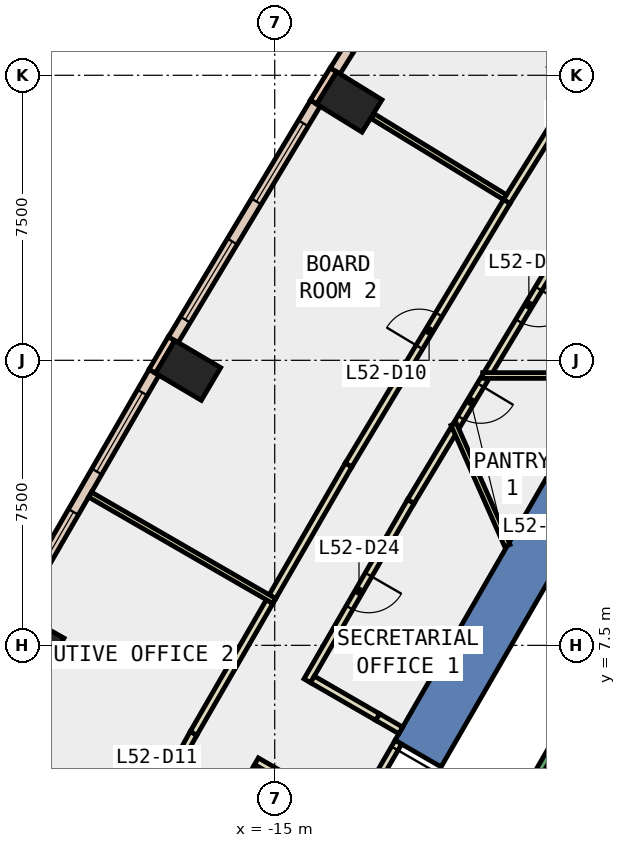
"""IFC4 building model, lengths in metres.
Left out: names, types, materials, properties, quantities, classifications, styles, units other than length and angle.
Written with IfcOpenShell. Run it as: python <this file> out.ifc"""

import sys

from ifc_helpers import new_model, si_unit, direction, frame, frame_2d, origin, origin_2d, place, context, subcontext, project, spatial, polyline, rectangle, outline, extrude, element, fill, save


model = new_model("IFC4")
c1 = context("Model", 3, precision=1e-05, world=origin(), true_north=direction((0.0, 1.0)))
c2 = subcontext(c1, "Body", "Model", "MODEL_VIEW")
j1 = project(units=[si_unit("LENGTHUNIT", "METRE"), si_unit("PLANEANGLEUNIT", "RADIAN")], contexts=[c1])
p1 = place(None, origin())
s1 = spatial("IfcSite", under=j1, at=p1, CompositionType="ELEMENT")
p2 = place(p1, origin())
s2 = spatial("IfcBuilding", under=s1, at=p2, CompositionType="ELEMENT")
p3 = place(p2, frame((0.0, 0.0, 231.8)))
s3 = spatial("IfcBuildingStorey", under=s2, at=p3, CompositionType="ELEMENT", Elevation=231.8)
for number, where, z_axis, x_axis in (
    (1, (-13.036, 21.797, -0.4), (0.0, 0.0, 1.0), (0.525, 0.851, 0.0)),
    (2, (-17.28, 14.733, -0.4), (0.0, 0.0, 1.0), (0.509, 0.861, 0.0)),
    (3, (-21.4, 7.599, -0.4), (0.0, 0.0, 1.0), (0.491, 0.871, 0.0)),
):
    element("IfcColumn", number, at=place(p3, frame(where, z_axis=z_axis, x_axis=x_axis)), inside=s3, PredefinedType="COLUMN", context=c2, shape_type="SweptSolid", body=[
        extrude(rectangle(XDim=1.0, YDim=1.4, at=origin_2d()), origin(), (0.0, 0.0, 1.0), 4.0),
    ])
p4 = place(p3, frame((0.0, 0.0, -0.4)))
e4 = element("IfcWall", 4, at=p4, inside=s3, PredefinedType="SHEAR", context=c2, shape_type="SweptSolid", body=[
    extrude(outline(polyline([(-11.834, 5.002), (-10.622, 4.302), (-5.831, 12.6), (-6.64, 14.0), (-11.834, 5.002)])), origin(), (0.0, 0.0, 1.0), 4.0),
])
p5 = place(p3, frame((-13.454, 22.643, 0.0), z_axis=(0.0, 0.0, 1.0), x_axis=(-0.525648735675, -0.850701714282, 0.0)))
e5 = element("IfcWall", 5, at=p5, inside=s3, PredefinedType="STANDARD", context=c2, shape_type="SweptSolid", body=[
    extrude(rectangle(XDim=1.0, YDim=0.2, at=frame_2d((0.5, 0.0))), origin(), (0.0, 0.0, 1.0), 3.6),
])
p6 = place(p3, frame((-17.715, 15.571, 0.0), z_axis=(0.0, 0.0, 1.0), x_axis=(-0.507980373775, -0.861368643416, 0.0)))
e6 = element("IfcWall", 6, at=p6, inside=s3, PredefinedType="STANDARD", context=c2, shape_type="SweptSolid", body=[
    extrude(rectangle(XDim=1.0, YDim=0.2, at=frame_2d((0.5, 0.0))), origin(), (0.0, 0.0, 1.0), 3.6),
])
p7 = place(p3, frame((-9.485, 28.893, 0.0), z_axis=(0.0, 0.0, 1.0), x_axis=(-0.530037467052, -0.847974223383, 0.0)))
e7 = element("IfcWall", 7, at=p7, inside=s3, PredefinedType="STANDARD", context=c2, shape_type="SweptSolid", body=[
    extrude(rectangle(XDim=7.405, YDim=0.3, at=frame_2d((3.702, 0.0))), origin(), (0.0, 0.0, 1.0), 3.6),
])
p8 = place(p7, frame((0.651, 0.0, 0.9)))
e8 = element("IfcOpeningElement", 8, at=p8, cuts=e7, PredefinedType="OPENING", context=c2, shape_type="SweptSolid", body=[
    extrude(rectangle(XDim=2.4, YDim=2.6, at=frame_2d((1.2, 1.3))), frame((0.0, 0.16, 0.0), z_axis=(0.0, -1.0, 0.0), x_axis=(1.0, 0.0, 0.0)), (0.0, 0.0, 1.0), 0.32),
])
p9 = place(p7, frame((4.354, 0.0, 0.9)))
e9 = element("IfcOpeningElement", 9, at=p9, cuts=e7, PredefinedType="OPENING", context=c2, shape_type="SweptSolid", body=[
    extrude(rectangle(XDim=2.4, YDim=2.6, at=frame_2d((1.2, 1.3))), frame((0.0, 0.16, 0.0), z_axis=(0.0, -1.0, 0.0), x_axis=(1.0, 0.0, 0.0)), (0.0, 0.0, 1.0), 0.32),
])
p10 = place(p3, frame((-13.931, 21.763, 0.0), z_axis=(0.0, 0.0, 1.0), x_axis=(-0.515049705348, -0.857160312323, 0.0)))
e10 = element("IfcWall", 10, at=p10, inside=s3, PredefinedType="STANDARD", context=c2, shape_type="SweptSolid", body=[
    extrude(rectangle(XDim=7.258, YDim=0.3, at=frame_2d((3.629, 0.0))), origin(), (0.0, 0.0, 1.0), 3.6),
])
p11 = place(p10, frame((0.614, 0.0, 0.9)))
e11 = element("IfcOpeningElement", 11, at=p11, cuts=e10, PredefinedType="OPENING", context=c2, shape_type="SweptSolid", body=[
    extrude(rectangle(XDim=2.4, YDim=2.6, at=frame_2d((1.2, 1.3))), frame((0.0, 0.16, 0.0), z_axis=(0.0, -1.0, 0.0), x_axis=(1.0, 0.0, 0.0)), (0.0, 0.0, 1.0), 0.32),
])
p12 = place(p10, frame((4.243, 0.0, 0.9)))
e12 = element("IfcOpeningElement", 12, at=p12, cuts=e10, PredefinedType="OPENING", context=c2, shape_type="SweptSolid", body=[
    extrude(rectangle(XDim=2.4, YDim=2.6, at=frame_2d((1.2, 1.3))), frame((0.0, 0.16, 0.0), z_axis=(0.0, -1.0, 0.0), x_axis=(1.0, 0.0, 0.0)), (0.0, 0.0, 1.0), 0.32),
])
p13 = place(p3, frame((-18.175, 14.683, 0.0), z_axis=(0.0, 0.0, 1.0), x_axis=(-0.500075798504, -0.865981637075, 0.0)))
e13 = element("IfcWall", 13, at=p13, inside=s3, PredefinedType="STANDARD", context=c2, shape_type="SweptSolid", body=[
    extrude(rectangle(XDim=7.257, YDim=0.3, at=frame_2d((3.628, 0.0))), origin(), (0.0, 0.0, 1.0), 3.6),
])
p14 = place(p13, frame((0.614, 0.0, 0.9)))
e14 = element("IfcOpeningElement", 14, at=p14, cuts=e13, PredefinedType="OPENING", context=c2, shape_type="SweptSolid", body=[
    extrude(rectangle(XDim=2.4, YDim=2.6, at=frame_2d((1.2, 1.3))), frame((0.0, 0.16, 0.0), z_axis=(0.0, -1.0, 0.0), x_axis=(1.0, 0.0, 0.0)), (0.0, 0.0, 1.0), 0.32),
])
p15 = place(p13, frame((4.242, 0.0, 0.9)))
e15 = element("IfcOpeningElement", 15, at=p15, cuts=e13, PredefinedType="OPENING", context=c2, shape_type="SweptSolid", body=[
    extrude(rectangle(XDim=2.4, YDim=2.6, at=frame_2d((1.2, 1.3))), frame((0.0, 0.16, 0.0), z_axis=(0.0, -1.0, 0.0), x_axis=(1.0, 0.0, 0.0)), (0.0, 0.0, 1.0), 0.32),
])
p16 = place(p3, frame((-9.466, 14.536, 0.0), z_axis=(0.0, 0.0, 1.0), x_axis=(-0.514545292, -0.857463201823, 0.0)))
e16 = element("IfcWall", 16, at=p16, inside=s3, PredefinedType="PARTITIONING", context=c2, shape_type="SweptSolid", body=[
    extrude(rectangle(XDim=1.449, YDim=0.2, at=frame_2d((0.725, 0.0))), origin(), (0.0, 0.0, 1.0), 3.6),
])
p17 = place(p16, frame((0.225, 0.0, 0.0)))
e17 = element("IfcOpeningElement", 17, at=p17, cuts=e16, PredefinedType="OPENING", context=c2, shape_type="SweptSolid", body=[
    extrude(rectangle(XDim=1.0, YDim=2.1, at=frame_2d((0.5, 1.05))), frame((0.0, 0.11, 0.0), z_axis=(0.0, -1.0, 0.0), x_axis=(1.0, 0.0, 0.0)), (0.0, 0.0, 1.0), 0.22),
])
p18 = place(p3, frame((-10.29, 13.164, 0.0), z_axis=(0.0, 0.0, 1.0), x_axis=(-0.514904735811, -0.857247404802, 0.0)))
e18 = element("IfcWall", 18, at=p18, inside=s3, PredefinedType="PARTITIONING", context=c2, shape_type="SweptSolid", body=[
    extrude(rectangle(XDim=2.194, YDim=0.2, at=frame_2d((1.097, 0.0))), origin(), (0.0, 0.0, 1.0), 3.6),
])
p19 = place(p3, frame((-11.42, 11.283, 0.0), z_axis=(0.0, 0.0, 1.0), x_axis=(-0.500179011873, -0.86592202656, 0.0)))
e19 = element("IfcWall", 19, at=p19, inside=s3, PredefinedType="PARTITIONING", context=c2, shape_type="SweptSolid", body=[
    extrude(rectangle(XDim=5.446, YDim=0.2, at=frame_2d((2.723, 0.0))), origin(), (0.0, 0.0, 1.0), 3.6),
])
p20 = place(p19, frame((2.223, 0.0, 0.0)))
e20 = element("IfcOpeningElement", 20, at=p20, cuts=e19, PredefinedType="OPENING", context=c2, shape_type="SweptSolid", body=[
    extrude(rectangle(XDim=1.0, YDim=2.1, at=frame_2d((0.5, 1.05))), frame((0.0, 0.11, 0.0), z_axis=(0.0, -1.0, 0.0), x_axis=(1.0, 0.0, 0.0)), (0.0, 0.0, 1.0), 0.22),
])
p21 = place(p3, frame((-14.007, 6.603, 0.0), z_axis=(0.0, 0.0, 1.0), x_axis=(0.866105617073, -0.499861040765, 0.0)))
e21 = element("IfcWall", 21, at=p21, inside=s3, PredefinedType="PARTITIONING", context=c2, shape_type="SweptSolid", body=[
    extrude(rectangle(XDim=1.982, YDim=0.2, at=frame_2d((0.991, 0.0))), origin(), (0.0, 0.0, 1.0), 3.6),
])
p22 = place(p3, frame((-7.237, 18.246, 0.0), z_axis=(0.0, 0.0, 1.0), x_axis=(-0.514959644878, -0.857214421336, 0.0)))
e22 = element("IfcWall", 22, at=p22, inside=s3, PredefinedType="PARTITIONING", context=c2, shape_type="SweptSolid", body=[
    extrude(rectangle(XDim=4.179, YDim=0.2, at=frame_2d((2.089, 0.0))), origin(), (0.0, 0.0, 1.0), 3.6),
])
p23 = place(p22, frame((1.589, 0.0, 0.0)))
e23 = element("IfcOpeningElement", 23, at=p23, cuts=e22, PredefinedType="OPENING", context=c2, shape_type="SweptSolid", body=[
    extrude(rectangle(XDim=1.0, YDim=2.1, at=frame_2d((0.5, 1.05))), frame((0.0, 0.11, 0.0), z_axis=(0.0, -1.0, 0.0), x_axis=(1.0, 0.0, 0.0)), (0.0, 0.0, 1.0), 0.22),
])
p24 = place(p3, frame((-15.482, 4.249, 0.0), z_axis=(0.0, 0.0, 1.0), x_axis=(-0.484683114876, -0.874689818252, 0.0)))
e24 = element("IfcWall", 24, at=p24, inside=s3, PredefinedType="PARTITIONING", context=c2, shape_type="SweptSolid", body=[
    extrude(rectangle(XDim=8.123, YDim=0.2, at=frame_2d((4.062, 0.0))), origin(), (0.0, 0.0, 1.0), 3.6),
])
p25 = place(p24, frame((3.561, 0.0, 0.0)))
e25 = element("IfcOpeningElement", 25, at=p25, cuts=e24, PredefinedType="OPENING", context=c2, shape_type="SweptSolid", body=[
    extrude(rectangle(XDim=1.0, YDim=2.1, at=frame_2d((0.5, 1.05))), frame((0.0, 0.11, 0.0), z_axis=(0.0, -1.0, 0.0), x_axis=(1.0, 0.0, 0.0)), (0.0, 0.0, 1.0), 0.22),
])
p26 = place(p3, frame((-8.896, 19.176, 0.0), z_axis=(0.0, 0.0, 1.0), x_axis=(0.529985425286, 0.848006750553, 0.0)))
e26 = element("IfcWall", 26, at=p26, inside=s3, PredefinedType="PARTITIONING", context=c2, shape_type="SweptSolid", body=[
    extrude(rectangle(XDim=8.119, YDim=0.2, at=frame_2d((4.06, 0.0))), origin(), (0.0, 0.0, 1.0), 3.6),
])
p27 = place(p26, frame((3.56, 0.0, 0.0)))
e27 = element("IfcOpeningElement", 27, at=p27, cuts=e26, PredefinedType="OPENING", context=c2, shape_type="SweptSolid", body=[
    extrude(rectangle(XDim=1.0, YDim=2.1, at=frame_2d((0.5, 1.05))), frame((0.0, 0.11, 0.0), z_axis=(0.0, -1.0, 0.0), x_axis=(1.0, 0.0, 0.0)), (0.0, 0.0, 1.0), 0.22),
])
p28 = place(p3, frame((-15.059, 8.78, 0.0), z_axis=(0.0, 0.0, 1.0), x_axis=(0.500093699572, 0.865971299552, 0.0)))
e28 = element("IfcWall", 28, at=p28, inside=s3, PredefinedType="PARTITIONING", context=c2, shape_type="SweptSolid", body=[
    extrude(rectangle(XDim=4.004, YDim=0.2, at=frame_2d((2.002, 0.0))), origin(), (0.0, 0.0, 1.0), 3.6),
])
p29 = place(p3, frame((-13.057, 12.247, 0.0), z_axis=(0.0, 0.0, 1.0), x_axis=(0.51490435266, 0.857247634941, 0.0)))
e29 = element("IfcWall", 29, at=p29, inside=s3, PredefinedType="PARTITIONING", context=c2, shape_type="SweptSolid", body=[
    extrude(rectangle(XDim=8.083, YDim=0.2, at=frame_2d((4.042, 0.0))), origin(), (0.0, 0.0, 1.0), 3.6),
])
p30 = place(p29, frame((3.616, 0.0, 0.0)))
e30 = element("IfcOpeningElement", 30, at=p30, cuts=e29, PredefinedType="OPENING", context=c2, shape_type="SweptSolid", body=[
    extrude(rectangle(XDim=1.0, YDim=2.1, at=frame_2d((0.5, 1.05))), frame((0.0, 0.11, 0.0), z_axis=(0.0, -1.0, 0.0), x_axis=(1.0, 0.0, 0.0)), (0.0, 0.0, 1.0), 0.22),
])
p31 = place(p3, frame((-19.076, 1.684, 0.0), z_axis=(0.0, 0.0, 1.0), x_axis=(0.484679349661, 0.874691904623, 0.0)))
e31 = element("IfcWall", 31, at=p31, inside=s3, PredefinedType="PARTITIONING", context=c2, shape_type="SweptSolid", body=[
    extrude(rectangle(XDim=4.002, YDim=0.2, at=frame_2d((2.001, 0.0))), origin(), (0.0, 0.0, 1.0), 3.6),
])
p32 = place(p31, frame((1.501, 0.0, 0.0)))
e32 = element("IfcOpeningElement", 32, at=p32, cuts=e31, PredefinedType="OPENING", context=c2, shape_type="SweptSolid", body=[
    extrude(rectangle(XDim=1.0, YDim=2.1, at=frame_2d((0.5, 1.05))), frame((0.0, 0.11, 0.0), z_axis=(0.0, -1.0, 0.0), x_axis=(1.0, 0.0, 0.0)), (0.0, 0.0, 1.0), 0.22),
])
p33 = place(p3, frame((-17.136, 5.185, 0.0), z_axis=(0.0, 0.0, 1.0), x_axis=(0.500102734445, 0.865966081899, 0.0)))
e33 = element("IfcWall", 33, at=p33, inside=s3, PredefinedType="PARTITIONING", context=c2, shape_type="SweptSolid", body=[
    extrude(rectangle(XDim=4.001, YDim=0.2, at=frame_2d((2.0, 0.0))), origin(), (0.0, 0.0, 1.0), 3.6),
])
p34 = place(p3, frame((-8.879, 10.123, 0.0), z_axis=(0.0, 0.0, 1.0), x_axis=(-0.404271206787, 0.914639159102, 0.0)))
e34 = element("IfcWall", 34, at=p34, inside=s3, PredefinedType="PARTITIONING", context=c2, shape_type="SweptSolid", body=[
    extrude(rectangle(XDim=3.495, YDim=0.15, at=frame_2d((1.748, 0.0))), origin(), (0.0, 0.0, 1.0), 3.6),
])
p35 = place(p3, frame((-4.047, 14.6, 0.0), z_axis=(0.0, 0.0, 1.0), x_axis=(-1.0, 0.0, 0.0)))
e35 = element("IfcWall", 35, at=p35, inside=s3, PredefinedType="PARTITIONING", context=c2, shape_type="SweptSolid", body=[
    extrude(rectangle(XDim=5.48, YDim=0.15, at=frame_2d((2.74, 0.0))), origin(), (0.0, 0.0, 1.0), 3.6),
])
p36 = place(p3, frame((-8.942, 19.292, 0.0), z_axis=(0.0, 0.0, 1.0), x_axis=(-0.85273109234, 0.522350154739, 0.0)))
e36 = element("IfcWall", 36, at=p36, inside=s3, PredefinedType="PARTITIONING", context=c2, shape_type="SweptSolid", body=[
    extrude(rectangle(XDim=4.08, YDim=0.15, at=frame_2d((2.04, 0.0))), origin(), (0.0, 0.0, 1.0), 3.6),
])
p37 = place(p3, frame((-15.01, 8.665, 0.0), z_axis=(0.0, 0.0, 1.0), x_axis=(-0.865961984968, 0.500109828528, 0.0)))
e37 = element("IfcWall", 37, at=p37, inside=s3, PredefinedType="PARTITIONING", context=c2, shape_type="SweptSolid", body=[
    extrude(rectangle(XDim=5.601, YDim=0.15, at=frame_2d((2.8, 0.0))), origin(), (0.0, 0.0, 1.0), 3.6),
])
p38 = place(p3, frame((-19.025, 1.57, 0.0), z_axis=(0.0, 0.0, 1.0), x_axis=(-0.874714019242, 0.484639437666, 0.0)))
e38 = element("IfcWall", 38, at=p38, inside=s3, PredefinedType="PARTITIONING", context=c2, shape_type="SweptSolid", body=[
    extrude(rectangle(XDim=5.6, YDim=0.15, at=frame_2d((2.8, 0.0))), origin(), (0.0, 0.0, 1.0), 3.6),
])
p39 = place(p3, frame((-11.747, 4.952, 0.0), z_axis=(0.0, 0.0, 1.0), x_axis=(-0.50002537861, -0.866010750942, 0.0)))
e39 = element("IfcWall", 39, at=p39, inside=s3, PredefinedType="PARTITIONING", context=c2, shape_type="SweptSolid", body=[
    extrude(rectangle(XDim=2.0, YDim=0.2, at=frame_2d((1.0, 0.0))), origin(), (0.0, 0.0, 1.0), 2.4),
])
p40 = place(p39, frame((0.19, 0.0, 0.0)))
e40 = element("IfcOpeningElement", 40, at=p40, cuts=e39, PredefinedType="OPENING", context=c2, shape_type="SweptSolid", body=[
    extrude(rectangle(XDim=1.8, YDim=2.1, at=frame_2d((0.9, 1.05))), frame((0.0, 0.11, 0.0), z_axis=(0.0, -1.0, 0.0), x_axis=(1.0, 0.0, 0.0)), (0.0, 0.0, 1.0), 0.22),
])
p41 = place(p3, frame((-12.29, 5.612, 0.0), z_axis=(0.0, 0.0, 1.0), x_axis=(0.865871789474, -0.500265973451, 0.0)))
e41 = element("IfcWall", 41, at=p41, inside=s3, PredefinedType="PARTITIONING", context=c2, shape_type="SweptSolid", body=[
    extrude(rectangle(XDim=0.7, YDim=0.2, at=frame_2d((0.35, 0.0))), origin(), (0.0, 0.0, 1.0), 2.4),
])
p42 = place(p3, frame((-13.59, 3.36, 0.0), z_axis=(0.0, 0.0, 1.0), x_axis=(-0.866004963011, 0.500035402787, 0.0)))
e42 = element("IfcWall", 42, at=p42, inside=s3, PredefinedType="PARTITIONING", context=c2, shape_type="SweptSolid", body=[
    extrude(rectangle(XDim=2.183, YDim=0.2, at=frame_2d((1.092, 0.0))), origin(), (0.0, 0.0, 1.0), 3.6),
])
p43 = place(p3, frame((-5.03, 9.388, 0.0), z_axis=(0.0, 0.0, 1.0), x_axis=(-0.499978703459, -0.866037698999, 0.0)))
e43 = element("IfcWall", 43, at=p43, inside=s3, PredefinedType="STANDARD", context=c2, shape_type="SweptSolid", body=[
    extrude(rectangle(XDim=6.9, YDim=0.2, at=frame_2d((3.45, 0.0))), origin(), (0.0, 0.0, 1.0), 3.6),
])
p44 = place(p11, origin())
e44 = element("IfcWindow", 44, at=p44, inside=s3, PartitioningType="SINGLE_PANEL", PredefinedType="WINDOW", context=c2, shape_type="SweptSolid", body=[
    extrude(rectangle(XDim=2.4, YDim=2.6, at=frame_2d((1.2, 1.3))), frame((0.0, 0.03, 0.0), z_axis=(0.0, -1.0, 0.0), x_axis=(1.0, 0.0, 0.0)), (0.0, 0.0, 1.0), 0.06),
])
fill(e11, e44)
p45 = place(p12, origin())
e45 = element("IfcWindow", 45, at=p45, inside=s3, PartitioningType="SINGLE_PANEL", PredefinedType="WINDOW", context=c2, shape_type="SweptSolid", body=[
    extrude(rectangle(XDim=2.4, YDim=2.6, at=frame_2d((1.2, 1.3))), frame((0.0, 0.03, 0.0), z_axis=(0.0, -1.0, 0.0), x_axis=(1.0, 0.0, 0.0)), (0.0, 0.0, 1.0), 0.06),
])
fill(e12, e45)
p46 = place(p14, origin())
e46 = element("IfcWindow", 46, at=p46, inside=s3, PartitioningType="SINGLE_PANEL", PredefinedType="WINDOW", context=c2, shape_type="SweptSolid", body=[
    extrude(rectangle(XDim=2.4, YDim=2.6, at=frame_2d((1.2, 1.3))), frame((0.0, 0.03, 0.0), z_axis=(0.0, -1.0, 0.0), x_axis=(1.0, 0.0, 0.0)), (0.0, 0.0, 1.0), 0.06),
])
fill(e14, e46)
p47 = place(p15, origin())
e47 = element("IfcWindow", 47, at=p47, inside=s3, PartitioningType="SINGLE_PANEL", PredefinedType="WINDOW", context=c2, shape_type="SweptSolid", body=[
    extrude(rectangle(XDim=2.4, YDim=2.6, at=frame_2d((1.2, 1.3))), frame((0.0, 0.03, 0.0), z_axis=(0.0, -1.0, 0.0), x_axis=(1.0, 0.0, 0.0)), (0.0, 0.0, 1.0), 0.06),
])
fill(e15, e47)
p48 = place(p30, origin())
e48 = element("IfcDoor", 48, at=p48, inside=s3, OperationType="SINGLE_SWING_RIGHT", PredefinedType="DOOR", context=c2, shape_type="SweptSolid", body=[
    extrude(rectangle(XDim=1.0, YDim=2.1, at=frame_2d((0.5, 1.05))), frame((0.0, 0.025, 0.0), z_axis=(0.0, -1.0, 0.0), x_axis=(1.0, 0.0, 0.0)), (0.0, 0.0, 1.0), 0.05),
])
fill(e30, e48)
p49 = place(p23, origin())
e49 = element("IfcDoor", 49, at=p49, inside=s3, OperationType="SINGLE_SWING_LEFT", PredefinedType="DOOR", context=c2, shape_type="SweptSolid", body=[
    extrude(rectangle(XDim=1.0, YDim=2.1, at=frame_2d((0.5, 1.05))), frame((0.0, 0.025, 0.0), z_axis=(0.0, -1.0, 0.0), x_axis=(1.0, 0.0, 0.0)), (0.0, 0.0, 1.0), 0.05),
])
fill(e23, e49)
p50 = place(p20, origin())
e50 = element("IfcDoor", 50, at=p50, inside=s3, OperationType="SINGLE_SWING_LEFT", PredefinedType="DOOR", context=c2, shape_type="SweptSolid", body=[
    extrude(rectangle(XDim=1.0, YDim=2.1, at=frame_2d((0.5, 1.05))), frame((0.0, 0.025, 0.0), z_axis=(0.0, -1.0, 0.0), x_axis=(1.0, 0.0, 0.0)), (0.0, 0.0, 1.0), 0.05),
])
fill(e20, e50)
p51 = place(p17, origin())
e51 = element("IfcDoor", 51, at=p51, inside=s3, OperationType="SINGLE_SWING_RIGHT", PredefinedType="DOOR", context=c2, shape_type="SweptSolid", body=[
    extrude(rectangle(XDim=1.0, YDim=2.1, at=frame_2d((0.5, 1.05))), frame((0.0, 0.025, 0.0), z_axis=(0.0, -1.0, 0.0), x_axis=(1.0, 0.0, 0.0)), (0.0, 0.0, 1.0), 0.05),
])
fill(e17, e51)
p52 = place(p40, origin())
e52 = element("IfcDoor", 52, at=p52, inside=s3, OperationType="DOUBLE_DOOR_SINGLE_SWING", PredefinedType="DOOR", context=c2, shape_type="SweptSolid", body=[
    extrude(rectangle(XDim=1.8, YDim=2.1, at=frame_2d((0.9, 1.05))), frame((0.0, 0.025, 0.0), z_axis=(0.0, -1.0, 0.0), x_axis=(1.0, 0.0, 0.0)), (0.0, 0.0, 1.0), 0.05),
])
fill(e40, e52)
save(model, sys.argv[1])
